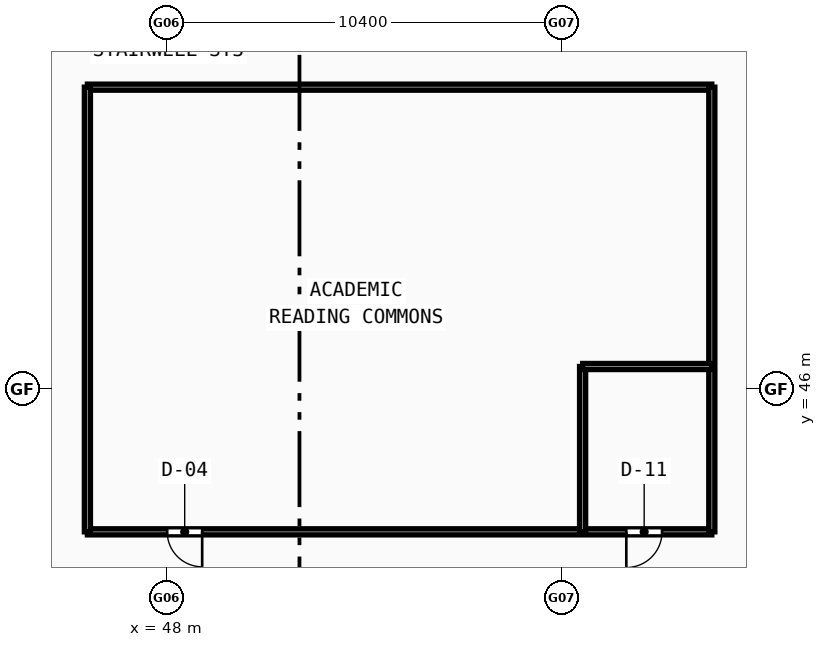
"""IFC4 building model, lengths in metres.
Left out: names, types, materials, properties, quantities, classifications, styles, units other than length and angle.
Written with IfcOpenShell. Run it as: python <this file> out.ifc"""

import sys

from ifc_helpers import new_model, si_unit, direction, frame, frame_2d, origin, place, context, subcontext, project, spatial, rectangle, extrude, source, transform, mapped, element, fill, save


model = new_model("IFC4")
c1 = context("Model", 3, precision=1e-05, world=origin(), true_north=direction((0.0, 1.0)))
c2 = subcontext(c1, "Body", "Model", "MODEL_VIEW")
j1 = project(units=[si_unit("LENGTHUNIT", "METRE"), si_unit("PLANEANGLEUNIT", "RADIAN")], contexts=[c1])
p1 = place(None, origin())
s1 = spatial("IfcSite", under=j1, at=p1, CompositionType="ELEMENT")
p2 = place(p1, origin())
s2 = spatial("IfcBuilding", under=s1, at=p2, CompositionType="ELEMENT")
p3 = place(p2, frame((0.0, 0.0, 44.92)))
s3 = spatial("IfcBuildingStorey", under=s2, at=p3, CompositionType="ELEMENT", Elevation=44.92)
p4 = place(p3, frame((45.92, 42.25, 0.0), z_axis=(0.0, 0.0, 1.0), x_axis=(1.0, 0.0, 0.0)))
e1 = element("IfcWall", 1, at=p4, inside=s3, PredefinedType="PARTITIONING", context=c2, shape_type="SweptSolid", body=[
    extrude(rectangle(XDim=16.43, YDim=0.16, at=frame_2d((8.215, 0.0))), origin(), (0.0, 0.0, 1.0), 2.67),
])
p5 = place(p4, frame((2.1, 0.0, 0.0)))
e2 = element("IfcOpeningElement", 2, at=p5, cuts=e1, PredefinedType="OPENING", context=c2, shape_type="SweptSolid", body=[
    extrude(rectangle(XDim=0.92, YDim=2.1, at=frame_2d((0.46, 1.05))), frame((0.0, 0.09, 0.0), z_axis=(0.0, -1.0, 0.0), x_axis=(1.0, 0.0, 0.0)), (0.0, 0.0, 1.0), 0.18),
])
p6 = place(p4, frame((14.18, 0.0, 0.0)))
e3 = element("IfcOpeningElement", 3, at=p6, cuts=e1, PredefinedType="OPENING", context=c2, shape_type="SweptSolid", body=[
    extrude(rectangle(XDim=0.94, YDim=2.1, at=frame_2d((0.47, 1.05))), frame((0.0, 0.09, 0.0), z_axis=(0.0, -1.0, 0.0), x_axis=(1.0, 0.0, 0.0)), (0.0, 0.0, 1.0), 0.18),
])
p7 = place(p3, frame((45.92, 53.95, 0.0), z_axis=(0.0, 0.0, 1.0), x_axis=(1.0, 0.0, 0.0)))
e4 = element("IfcWall", 4, at=p7, inside=s3, PredefinedType="PARTITIONING", context=c2, shape_type="SweptSolid", body=[
    extrude(rectangle(XDim=16.43, YDim=0.16, at=frame_2d((8.215, 0.0))), origin(), (0.0, 0.0, 1.0), 2.67),
])
p8 = place(p3, frame((45.92, 42.25, 0.0), z_axis=(0.0, 0.0, 1.0), x_axis=(0.0, 1.0, 0.0)))
e5 = element("IfcWall", 5, at=p8, inside=s3, PredefinedType="PARTITIONING", context=c2, shape_type="SweptSolid", body=[
    extrude(rectangle(XDim=11.7, YDim=0.16, at=frame_2d((5.85, 0.0))), origin(), (0.0, 0.0, 1.0), 2.97),
])
p9 = place(p3, frame((62.35, 42.25, 0.0), z_axis=(0.0, 0.0, 1.0), x_axis=(0.0, 1.0, 0.0)))
e6 = element("IfcWall", 6, at=p9, inside=s3, PredefinedType="PARTITIONING", context=c2, shape_type="SweptSolid", body=[
    extrude(rectangle(XDim=11.7, YDim=0.16, at=frame_2d((5.85, 0.0))), origin(), (0.0, 0.0, 1.0), 2.67),
])
p10 = place(p3, frame((58.95, 42.25, 0.0), z_axis=(0.0, 0.0, 1.0), x_axis=(0.0, 1.0, 0.0)))
e7 = element("IfcWall", 7, at=p10, inside=s3, PredefinedType="PARTITIONING", context=c2, shape_type="SweptSolid", body=[
    extrude(rectangle(XDim=4.35, YDim=0.16, at=frame_2d((2.175, 0.0))), origin(), (0.0, 0.0, 1.0), 2.67),
])
p11 = place(p3, frame((58.95, 46.6, 0.0), z_axis=(0.0, 0.0, 1.0), x_axis=(1.0, 0.0, 0.0)))
e8 = element("IfcWall", 8, at=p11, inside=s3, PredefinedType="PARTITIONING", context=c2, shape_type="SweptSolid", body=[
    extrude(rectangle(XDim=3.4, YDim=0.16, at=frame_2d((1.7, 0.0))), origin(), (0.0, 0.0, 1.0), 2.67),
])
m1 = source(origin(), c2, "Body", "SweptSolid", [
    extrude(rectangle(XDim=0.92, YDim=2.1, at=frame_2d((0.46, 1.05))), frame((0.0, 0.025, 0.0), z_axis=(0.0, -1.0, 0.0), x_axis=(1.0, 0.0, 0.0)), (0.0, 0.0, 1.0), 0.05),
])
p12 = place(p5, frame((0.92, 0.0, 0.0), z_axis=(0.0, 0.0, 1.0), x_axis=(-1.0, 0.0, 0.0)))
e9 = element("IfcDoor", 9, at=p12, inside=s3, OperationType="SINGLE_SWING_LEFT", PredefinedType="DOOR", context=c2, shape_type="MappedRepresentation", body=[
    mapped(m1, transform((0.0, 0.0, 0.0), scale=1.0)),
])
fill(e2, e9)
m2 = source(origin(), c2, "Body", "SweptSolid", [
    extrude(rectangle(XDim=0.94, YDim=2.1, at=frame_2d((0.47, 1.05))), frame((0.0, 0.025, 0.0), z_axis=(0.0, -1.0, 0.0), x_axis=(1.0, 0.0, 0.0)), (0.0, 0.0, 1.0), 0.05),
])
p13 = place(p6, frame((0.94, 0.0, 0.0), z_axis=(0.0, 0.0, 1.0), x_axis=(-1.0, 0.0, 0.0)))
e10 = element("IfcDoor", 10, at=p13, inside=s3, OperationType="SINGLE_SWING_RIGHT", PredefinedType="DOOR", context=c2, shape_type="MappedRepresentation", body=[
    mapped(m2, transform((0.0, 0.0, 0.0), scale=1.0)),
])
fill(e3, e10)
save(model, sys.argv[1])
